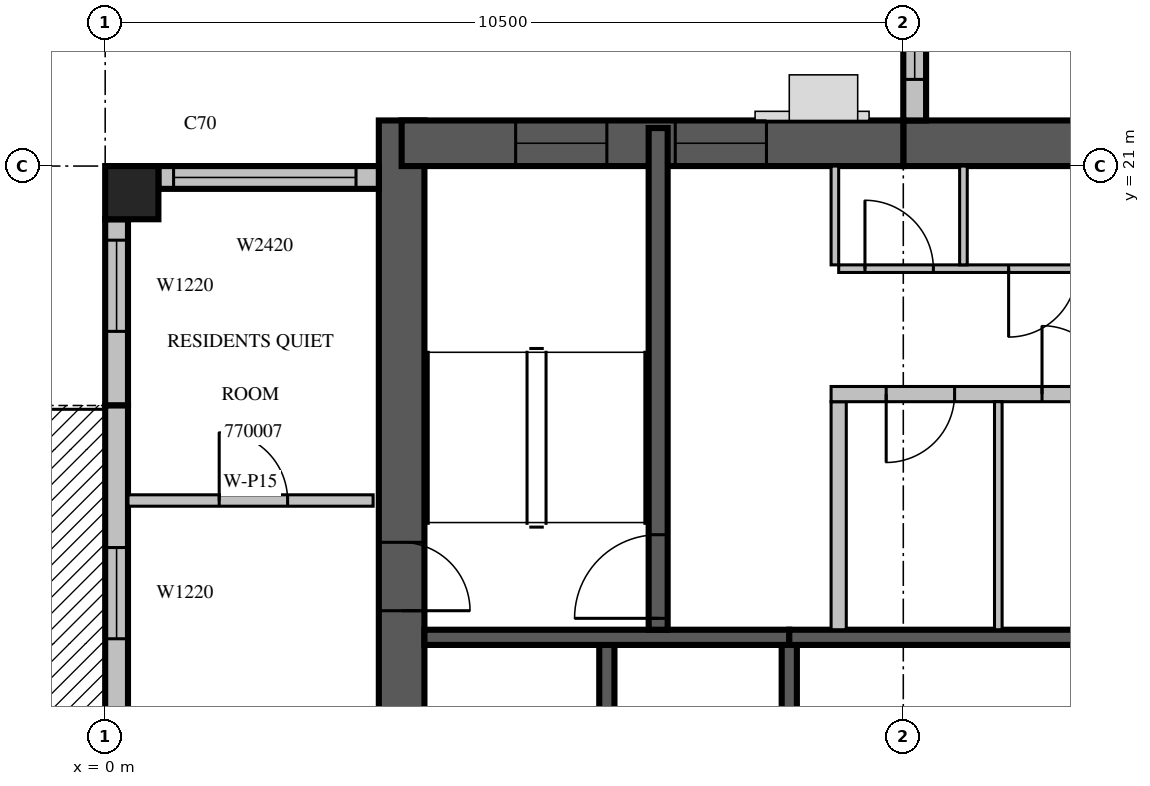
"""IFC4 building model, lengths in metres.
Left out: names, types, materials, properties, quantities, classifications, styles, units other than length and angle.
Written with IfcOpenShell. Run it as: python <this file> out.ifc"""

import sys

from ifc_helpers import new_model, si_unit, direction, frame, frame_2d, origin, origin_2d, place, context, subcontext, project, spatial, rectangle, extrude, source, transform, mapped, element, fill, save


model = new_model("IFC4")
c1 = context("Model", 3, precision=1e-05, world=origin(), true_north=direction((0.0, 1.0)))
c2 = subcontext(c1, "Body", "Model", "MODEL_VIEW")
j1 = project(units=[si_unit("LENGTHUNIT", "METRE"), si_unit("PLANEANGLEUNIT", "RADIAN")], contexts=[c1])
p1 = place(None, origin())
s1 = spatial("IfcSite", under=j1, at=p1, CompositionType="ELEMENT")
p2 = place(p1, origin())
s2 = spatial("IfcBuilding", under=s1, at=p2, CompositionType="ELEMENT")
p3 = place(p2, frame((0.0, 0.0, 305.5)))
s3 = spatial("IfcBuildingStorey", under=s2, at=p3, CompositionType="ELEMENT", Elevation=305.5)
m1 = source(origin(), c2, "Body", "SweptSolid", [
    extrude(rectangle(XDim=0.7, YDim=0.7, at=origin_2d()), origin(), (0.0, 0.0, 1.0), 3.5),
])
p4 = place(p3, frame((0.35, 20.65, 0.0), z_axis=(0.0, 0.0, 1.0), x_axis=(1.0, 0.0, 0.0)))
e1 = element("IfcColumn", 1, at=p4, inside=s3, PredefinedType="COLUMN", context=c2, shape_type="MappedRepresentation", body=[
    mapped(m1, transform((0.0, 0.0, 0.0), scale=1.0)),
])
m2 = source(origin(), c2, "Body", "SweptSolid", [
    extrude(rectangle(XDim=17.4, YDim=0.6, at=frame_2d((8.7, 0.0))), origin(), (0.0, 0.0, 1.0), 3.5),
])
p5 = place(p3, frame((3.9, 4.2, 0.0), z_axis=(0.0, 0.0, 1.0), x_axis=(0.0, 1.0, 0.0)))
e2 = element("IfcWall", 2, at=p5, inside=s3, PredefinedType="SHEAR", context=c2, shape_type="MappedRepresentation", body=[
    mapped(m2, transform((0.0, 0.0, 0.0), scale=1.0)),
])
m3 = source(origin(), c2, "Body", "SweptSolid", [
    extrude(rectangle(XDim=2.2, YDim=2.1, at=frame_2d((1.1, 1.05))), frame((0.0, 0.31, 0.0), z_axis=(0.0, -1.0, 0.0), x_axis=(1.0, 0.0, 0.0)), (0.0, 0.0, 1.0), 0.62),
])
p6 = place(p5, frame((4.2, 0.0, 0.0)))
e3 = element("IfcOpeningElement", 3, at=p6, cuts=e2, PredefinedType="OPENING", context=c2, shape_type="MappedRepresentation", body=[
    mapped(m3, transform((0.0, 0.0, 0.0), scale=1.0)),
])
m4 = source(origin(), c2, "Body", "SweptSolid", [
    extrude(rectangle(XDim=0.9, YDim=2.1, at=frame_2d((0.45, 1.05))), frame((0.0, 0.31, 0.0), z_axis=(0.0, -1.0, 0.0), x_axis=(1.0, 0.0, 0.0)), (0.0, 0.0, 1.0), 0.62),
])
p7 = place(p5, frame((10.95, 0.0, 0.0)))
e4 = element("IfcOpeningElement", 4, at=p7, cuts=e2, PredefinedType="OPENING", context=c2, shape_type="MappedRepresentation", body=[
    mapped(m4, transform((0.0, 0.0, 0.0), scale=1.0)),
])
m5 = source(origin(), c2, "Body", "SweptSolid", [
    extrude(rectangle(XDim=11.1, YDim=0.6, at=frame_2d((5.55, 0.0))), origin(), (0.0, 0.0, 1.0), 3.5),
])
p8 = place(p3, frame((10.5, 21.3, 0.0), z_axis=(0.0, 0.0, 1.0), x_axis=(1.0, 0.0, 0.0)))
e5 = element("IfcWall", 5, at=p8, inside=s3, PredefinedType="SHEAR", context=c2, shape_type="MappedRepresentation", body=[
    mapped(m5, transform((0.0, 0.0, 0.0), scale=1.0)),
])
m6 = source(origin(), c2, "Body", "SweptSolid", [
    extrude(rectangle(XDim=1.2, YDim=2.1, at=frame_2d((0.6, 1.05))), frame((0.0, 0.31, 0.0), z_axis=(0.0, -1.0, 0.0), x_axis=(1.0, 0.0, 0.0)), (0.0, 0.0, 1.0), 0.62),
])
p9 = place(p8, frame((8.7, 0.0, 0.0)))
e6 = element("IfcOpeningElement", 6, at=p9, cuts=e5, PredefinedType="OPENING", context=c2, shape_type="MappedRepresentation", body=[
    mapped(m6, transform((0.0, 0.0, 0.0), scale=1.0)),
])
m7 = source(origin(), c2, "Body", "SweptSolid", [
    extrude(rectangle(XDim=6.6, YDim=0.6, at=frame_2d((3.3, 0.0))), origin(), (0.0, 0.0, 1.0), 3.5),
])
p10 = place(p3, frame((3.9, 21.3, 0.0), z_axis=(0.0, 0.0, 1.0), x_axis=(1.0, 0.0, 0.0)))
e7 = element("IfcWall", 7, at=p10, inside=s3, PredefinedType="SHEAR", context=c2, shape_type="MappedRepresentation", body=[
    mapped(m7, transform((0.0, 0.0, 0.0), scale=1.0)),
])
m8 = source(origin(), c2, "Body", "SweptSolid", [
    extrude(rectangle(XDim=1.2, YDim=2.4, at=frame_2d((0.6, 1.2))), frame((0.0, 0.31, 0.0), z_axis=(0.0, -1.0, 0.0), x_axis=(1.0, 0.0, 0.0)), (0.0, 0.0, 1.0), 0.62),
])
p11 = place(p10, frame((1.5, 0.0, 0.6)))
e8 = element("IfcOpeningElement", 8, at=p11, cuts=e7, PredefinedType="OPENING", context=c2, shape_type="MappedRepresentation", body=[
    mapped(m8, transform((0.0, 0.0, 0.0), scale=1.0)),
])
p12 = place(p10, frame((3.6, 0.0, 0.6)))
e9 = element("IfcOpeningElement", 9, at=p12, cuts=e7, PredefinedType="OPENING", context=c2, shape_type="MappedRepresentation", body=[
    mapped(m8, transform((0.0, 0.0, 0.0), scale=1.0)),
])
m9 = source(origin(), c2, "Body", "SweptSolid", [
    extrude(rectangle(XDim=5.28, YDim=0.3, at=frame_2d((2.64, 0.0))), origin(), (0.0, 0.0, 1.0), 3.1),
])
p13 = place(p3, frame((10.65, 26.88, 0.0), z_axis=(0.0, 0.0, 1.0), x_axis=(0.0, -1.0, 0.0)))
e10 = element("IfcWall", 10, at=p13, inside=s3, PredefinedType="STANDARD", context=c2, shape_type="MappedRepresentation", body=[
    mapped(m9, transform((0.0, 0.0, 0.0), scale=1.0)),
])
m10 = source(origin(), c2, "Body", "SweptSolid", [
    extrude(rectangle(XDim=3.6, YDim=2.0, at=frame_2d((1.8, 1.0))), frame((0.0, 0.16, 0.0), z_axis=(0.0, -1.0, 0.0), x_axis=(1.0, 0.0, 0.0)), (0.0, 0.0, 1.0), 0.32),
])
p14 = place(p13, frame((1.14, 0.0, 0.6)))
e11 = element("IfcOpeningElement", 11, at=p14, cuts=e10, PredefinedType="OPENING", context=c2, shape_type="MappedRepresentation", body=[
    mapped(m10, transform((0.0, 0.0, 0.0), scale=1.0)),
])
m11 = source(origin(), c2, "Body", "SweptSolid", [
    extrude(rectangle(XDim=2.9, YDim=0.3, at=frame_2d((1.45, 0.0))), origin(), (0.0, 0.0, 1.0), 3.1),
])
p15 = place(p3, frame((3.6, 20.85, 0.0), z_axis=(0.0, 0.0, 1.0), x_axis=(-1.0, 0.0, 0.0)))
e12 = element("IfcWall", 12, at=p15, inside=s3, PredefinedType="STANDARD", context=c2, shape_type="MappedRepresentation", body=[
    mapped(m11, transform((0.0, 0.0, 0.0), scale=1.0)),
])
m12 = source(origin(), c2, "Body", "SweptSolid", [
    extrude(rectangle(XDim=2.4, YDim=2.0, at=frame_2d((1.2, 1.0))), frame((0.0, 0.16, 0.0), z_axis=(0.0, -1.0, 0.0), x_axis=(1.0, 0.0, 0.0)), (0.0, 0.0, 1.0), 0.32),
])
p16 = place(p15, frame((0.3, 0.0, 0.6)))
e13 = element("IfcOpeningElement", 13, at=p16, cuts=e12, PredefinedType="OPENING", context=c2, shape_type="MappedRepresentation", body=[
    mapped(m12, transform((0.0, 0.0, 0.0), scale=1.0)),
])
m13 = source(origin(), c2, "Body", "SweptSolid", [
    extrude(rectangle(XDim=2.45, YDim=0.3, at=frame_2d((1.225, 0.0))), origin(), (0.0, 0.0, 1.0), 3.1),
])
p17 = place(p3, frame((0.15, 20.3, 0.0), z_axis=(0.0, 0.0, 1.0), x_axis=(0.0, -1.0, 0.0)))
e14 = element("IfcWall", 14, at=p17, inside=s3, PredefinedType="STANDARD", context=c2, shape_type="MappedRepresentation", body=[
    mapped(m13, transform((0.0, 0.0, 0.0), scale=1.0)),
])
m14 = source(origin(), c2, "Body", "SweptSolid", [
    extrude(rectangle(XDim=1.2, YDim=2.0, at=frame_2d((0.6, 1.0))), frame((0.0, 0.16, 0.0), z_axis=(0.0, -1.0, 0.0), x_axis=(1.0, 0.0, 0.0)), (0.0, 0.0, 1.0), 0.32),
])
p18 = place(p17, frame((0.275, 0.0, 0.6)))
e15 = element("IfcOpeningElement", 15, at=p18, cuts=e14, PredefinedType="OPENING", context=c2, shape_type="MappedRepresentation", body=[
    mapped(m14, transform((0.0, 0.0, 0.0), scale=1.0)),
])
m15 = source(origin(), c2, "Body", "SweptSolid", [
    extrude(rectangle(XDim=7.0, YDim=0.3, at=frame_2d((3.5, 0.0))), origin(), (0.0, 0.0, 1.0), 3.1),
])
p19 = place(p3, frame((0.15, 17.85, 0.0), z_axis=(0.0, 0.0, 1.0), x_axis=(0.0, -1.0, 0.0)))
e16 = element("IfcWall", 16, at=p19, inside=s3, PredefinedType="STANDARD", context=c2, shape_type="MappedRepresentation", body=[
    mapped(m15, transform((0.0, 0.0, 0.0), scale=1.0)),
])
m16 = source(origin(), c2, "Body", "SweptSolid", [
    extrude(rectangle(XDim=1.8, YDim=2.4, at=frame_2d((0.9, 1.2))), frame((0.0, 0.16, 0.0), z_axis=(0.0, -1.0, 0.0), x_axis=(1.0, 0.0, 0.0)), (0.0, 0.0, 1.0), 0.32),
])
p20 = place(p19, frame((4.725, 0.0, 0.0)))
e17 = element("IfcOpeningElement", 17, at=p20, cuts=e16, PredefinedType="OPENING", context=c2, shape_type="MappedRepresentation", body=[
    mapped(m16, transform((0.0, 0.0, 0.0), scale=1.0)),
])
p21 = place(p19, frame((1.869, 0.0, 0.6)))
e18 = element("IfcOpeningElement", 18, at=p21, cuts=e16, PredefinedType="OPENING", context=c2, shape_type="MappedRepresentation", body=[
    mapped(m14, transform((0.0, 0.0, 0.0), scale=1.0)),
])
m17 = source(origin(), c2, "Body", "SweptSolid", [
    extrude(rectangle(XDim=3.0, YDim=0.2, at=frame_2d((1.5, 0.0))), origin(), (0.0, 0.0, 1.0), 3.5),
])
p22 = place(p3, frame((6.6, 11.7, 0.0), z_axis=(0.0, 0.0, 1.0), x_axis=(0.0, 1.0, 0.0)))
e19 = element("IfcWall", 19, at=p22, inside=s3, PredefinedType="SOLIDWALL", context=c2, shape_type="MappedRepresentation", body=[
    mapped(m17, transform((0.0, 0.0, 0.0), scale=1.0)),
])
m18 = source(origin(), c2, "Body", "SweptSolid", [
    extrude(rectangle(XDim=3.0, YDim=0.2, at=frame_2d((1.5, 0.0))), origin(), (0.0, 0.0, 1.0), 3.1),
])
p23 = place(p3, frame((9.0, 11.7, 0.0), z_axis=(0.0, 0.0, 1.0), x_axis=(0.0, 1.0, 0.0)))
e20 = element("IfcWall", 20, at=p23, inside=s3, PredefinedType="SOLIDWALL", context=c2, shape_type="MappedRepresentation", body=[
    mapped(m18, transform((0.0, 0.0, 0.0), scale=1.0)),
])
m19 = source(origin(), c2, "Body", "SweptSolid", [
    extrude(rectangle(XDim=4.8, YDim=0.2, at=frame_2d((2.4, 0.0))), origin(), (0.0, 0.0, 1.0), 3.5),
])
p24 = place(p3, frame((4.2, 14.8, 0.0), z_axis=(0.0, 0.0, 1.0), x_axis=(1.0, 0.0, 0.0)))
e21 = element("IfcWall", 21, at=p24, inside=s3, PredefinedType="SOLIDWALL", context=c2, shape_type="MappedRepresentation", body=[
    mapped(m19, transform((0.0, 0.0, 0.0), scale=1.0)),
])
m20 = source(origin(), c2, "Body", "SweptSolid", [
    extrude(rectangle(XDim=4.8, YDim=0.2, at=frame_2d((2.4, 0.0))), origin(), (0.0, 0.0, 1.0), 3.1),
])
p25 = place(p3, frame((9.0, 14.8, 0.0), z_axis=(0.0, 0.0, 1.0), x_axis=(1.0, 0.0, 0.0)))
e22 = element("IfcWall", 22, at=p25, inside=s3, PredefinedType="SOLIDWALL", context=c2, shape_type="MappedRepresentation", body=[
    mapped(m20, transform((0.0, 0.0, 0.0), scale=1.0)),
])
m21 = source(origin(), c2, "Body", "SweptSolid", [
    extrude(rectangle(XDim=6.6, YDim=0.25, at=frame_2d((3.3, 0.0))), origin(), (0.0, 0.0, 1.0), 3.1),
])
p26 = place(p3, frame((7.275, 14.9, 0.0), z_axis=(0.0, 0.0, 1.0), x_axis=(0.0, 1.0, 0.0)))
e23 = element("IfcWall", 23, at=p26, inside=s3, PredefinedType="SOLIDWALL", context=c2, shape_type="MappedRepresentation", body=[
    mapped(m21, transform((0.0, 0.0, 0.0), scale=1.0)),
])
m22 = source(origin(), c2, "Body", "SweptSolid", [
    extrude(rectangle(XDim=1.1, YDim=2.1, at=frame_2d((0.55, 1.05))), frame((0.0, 0.135, 0.0), z_axis=(0.0, -1.0, 0.0), x_axis=(1.0, 0.0, 0.0)), (0.0, 0.0, 1.0), 0.27),
])
p27 = place(p26, frame((0.15, 0.0, 0.0)))
e24 = element("IfcOpeningElement", 24, at=p27, cuts=e23, PredefinedType="OPENING", context=c2, shape_type="MappedRepresentation", body=[
    mapped(m22, transform((0.0, 0.0, 0.0), scale=1.0)),
])
m23 = source(origin(), c2, "Body", "SweptSolid", [
    extrude(rectangle(XDim=3.0, YDim=0.2, at=frame_2d((1.5, 0.0))), origin(), (0.0, 0.0, 1.0), 3.1),
])
p28 = place(p3, frame((9.65, 14.9, 0.0), z_axis=(0.0, 0.0, 1.0), x_axis=(0.0, 1.0, 0.0)))
e25 = element("IfcWall", 25, at=p28, inside=s3, PredefinedType="PARTITIONING", context=c2, shape_type="MappedRepresentation", body=[
    mapped(m23, transform((0.0, 0.0, 0.0), scale=1.0)),
])
m24 = source(origin(), c2, "Body", "SweptSolid", [
    extrude(rectangle(XDim=11.45, YDim=0.2, at=frame_2d((5.725, 0.0))), origin(), (0.0, 0.0, 1.0), 3.1),
])
p29 = place(p3, frame((9.55, 18.0, 0.0), z_axis=(0.0, 0.0, 1.0), x_axis=(1.0, 0.0, 0.0)))
e26 = element("IfcWall", 26, at=p29, inside=s3, PredefinedType="PARTITIONING", context=c2, shape_type="MappedRepresentation", body=[
    mapped(m24, transform((0.0, 0.0, 0.0), scale=1.0)),
])
m25 = source(origin(), c2, "Body", "SweptSolid", [
    extrude(rectangle(XDim=0.9, YDim=2.1, at=frame_2d((0.45, 1.05))), frame((0.0, 0.11, 0.0), z_axis=(0.0, -1.0, 0.0), x_axis=(1.0, 0.0, 0.0)), (0.0, 0.0, 1.0), 0.22),
])
p30 = place(p29, frame((0.725, 0.0, 0.0)))
e27 = element("IfcOpeningElement", 27, at=p30, cuts=e26, PredefinedType="OPENING", context=c2, shape_type="MappedRepresentation", body=[
    mapped(m25, transform((0.0, 0.0, 0.0), scale=1.0)),
])
p31 = place(p29, frame((2.775, 0.0, 0.0)))
e28 = element("IfcOpeningElement", 28, at=p31, cuts=e26, PredefinedType="OPENING", context=c2, shape_type="MappedRepresentation", body=[
    mapped(m25, transform((0.0, 0.0, 0.0), scale=1.0)),
])
m26 = source(origin(), c2, "Body", "SweptSolid", [
    extrude(rectangle(XDim=1.1, YDim=2.1, at=frame_2d((0.55, 1.05))), frame((0.0, 0.11, 0.0), z_axis=(0.0, -1.0, 0.0), x_axis=(1.0, 0.0, 0.0)), (0.0, 0.0, 1.0), 0.22),
])
p32 = place(p29, frame((7.35, 0.0, 0.0)))
e29 = element("IfcOpeningElement", 29, at=p32, cuts=e26, PredefinedType="OPENING", context=c2, shape_type="MappedRepresentation", body=[
    mapped(m26, transform((0.0, 0.0, 0.0), scale=1.0)),
])
m27 = source(origin(), c2, "Body", "SweptSolid", [
    extrude(rectangle(XDim=9.4, YDim=0.1, at=frame_2d((4.7, 0.0))), origin(), (0.0, 0.0, 1.0), 3.1),
])
p33 = place(p3, frame((9.65, 19.65, 0.0), z_axis=(0.0, 0.0, 1.0), x_axis=(1.0, 0.0, 0.0)))
e30 = element("IfcWall", 30, at=p33, inside=s3, PredefinedType="PARTITIONING", context=c2, shape_type="MappedRepresentation", body=[
    mapped(m27, transform((0.0, 0.0, 0.0), scale=1.0)),
])
m28 = source(origin(), c2, "Body", "SweptSolid", [
    extrude(rectangle(XDim=0.9, YDim=2.1, at=frame_2d((0.45, 1.05))), frame((0.0, 0.06, 0.0), z_axis=(0.0, -1.0, 0.0), x_axis=(1.0, 0.0, 0.0)), (0.0, 0.0, 1.0), 0.12),
])
p34 = place(p33, frame((0.346, 0.0, 0.0)))
e31 = element("IfcOpeningElement", 31, at=p34, cuts=e30, PredefinedType="OPENING", context=c2, shape_type="MappedRepresentation", body=[
    mapped(m28, transform((0.0, 0.0, 0.0), scale=1.0)),
])
p35 = place(p33, frame((2.236, 0.0, 0.0)))
e32 = element("IfcOpeningElement", 32, at=p35, cuts=e30, PredefinedType="OPENING", context=c2, shape_type="MappedRepresentation", body=[
    mapped(m28, transform((0.0, 0.0, 0.0), scale=1.0)),
])
p36 = place(p33, frame((4.026, 0.0, 0.0)))
e33 = element("IfcOpeningElement", 33, at=p36, cuts=e30, PredefinedType="OPENING", context=c2, shape_type="MappedRepresentation", body=[
    mapped(m28, transform((0.0, 0.0, 0.0), scale=1.0)),
])
p37 = place(p33, frame((5.742, 0.0, 0.0)))
e34 = element("IfcOpeningElement", 34, at=p37, cuts=e30, PredefinedType="OPENING", context=c2, shape_type="MappedRepresentation", body=[
    mapped(m28, transform((0.0, 0.0, 0.0), scale=1.0)),
])
p38 = place(p33, frame((7.856, 0.0, 0.0)))
e35 = element("IfcOpeningElement", 35, at=p38, cuts=e30, PredefinedType="OPENING", context=c2, shape_type="MappedRepresentation", body=[
    mapped(m28, transform((0.0, 0.0, 0.0), scale=1.0)),
])
m29 = source(origin(), c2, "Body", "SweptSolid", [
    extrude(rectangle(XDim=1.3, YDim=0.1, at=frame_2d((0.65, 0.0))), origin(), (0.0, 0.0, 1.0), 3.1),
])
for number, where, z_axis, x_axis in (
    (36, (11.291, 19.7, 0.0), (0.0, 0.0, 1.0), (0.0, 1.0, 0.0)),
    (37, (9.6, 19.7, 0.0), (0.0, 0.0, 1.0), (0.0, 1.0, 0.0)),
):
    element("IfcWall", number, at=place(p3, frame(where, z_axis=z_axis, x_axis=x_axis)), inside=s3, PredefinedType="PARTITIONING", context=c2, shape_type="MappedRepresentation", body=[
        mapped(m29, transform((0.0, 0.0, 0.0), scale=1.0)),
    ])
m30 = source(origin(), c2, "Body", "SweptSolid", [
    extrude(rectangle(XDim=3.0, YDim=0.1, at=frame_2d((1.5, 0.0))), origin(), (0.0, 0.0, 1.0), 3.1),
])
p39 = place(p3, frame((11.75, 14.9, 0.0), z_axis=(0.0, 0.0, 1.0), x_axis=(0.0, 1.0, 0.0)))
e38 = element("IfcWall", 38, at=p39, inside=s3, PredefinedType="PARTITIONING", context=c2, shape_type="MappedRepresentation", body=[
    mapped(m30, transform((0.0, 0.0, 0.0), scale=1.0)),
])
m31 = source(origin(), c2, "Body", "SweptSolid", [
    extrude(rectangle(XDim=3.225, YDim=0.15, at=frame_2d((1.613, 0.0))), origin(), (0.0, 0.0, 1.0), 3.1),
])
p40 = place(p3, frame((0.3, 16.6, 0.0), z_axis=(0.0, 0.0, 1.0), x_axis=(1.0, 0.0, 0.0)))
e39 = element("IfcWall", 39, at=p40, inside=s3, PredefinedType="PARTITIONING", context=c2, shape_type="MappedRepresentation", body=[
    mapped(m31, transform((0.0, 0.0, 0.0), scale=1.0)),
])
m32 = source(origin(), c2, "Body", "SweptSolid", [
    extrude(rectangle(XDim=0.9, YDim=2.1, at=frame_2d((0.45, 1.05))), frame((0.0, 0.085, 0.0), z_axis=(0.0, -1.0, 0.0), x_axis=(1.0, 0.0, 0.0)), (0.0, 0.0, 1.0), 0.17),
])
p41 = place(p40, frame((1.2, 0.0, 0.0)))
e40 = element("IfcOpeningElement", 40, at=p41, cuts=e39, PredefinedType="OPENING", context=c2, shape_type="MappedRepresentation", body=[
    mapped(m32, transform((0.0, 0.0, 0.0), scale=1.0)),
])
m33 = source(origin(), c2, "Body", "SweptSolid", [
    extrude(rectangle(XDim=3.6, YDim=2.0, at=frame_2d((1.8, 1.0))), frame((0.0, 0.03, 0.0), z_axis=(0.0, -1.0, 0.0), x_axis=(1.0, 0.0, 0.0)), (0.0, 0.0, 1.0), 0.06),
])
p42 = place(p14, origin())
e41 = element("IfcWindow", 41, at=p42, inside=s3, PartitioningType="SINGLE_PANEL", PredefinedType="WINDOW", context=c2, shape_type="MappedRepresentation", body=[
    mapped(m33, transform((0.0, 0.0, 0.0), scale=1.0)),
])
fill(e11, e41)
m34 = source(origin(), c2, "Body", "SweptSolid", [
    extrude(rectangle(XDim=2.4, YDim=2.0, at=frame_2d((1.2, 1.0))), frame((0.0, 0.03, 0.0), z_axis=(0.0, -1.0, 0.0), x_axis=(1.0, 0.0, 0.0)), (0.0, 0.0, 1.0), 0.06),
])
p43 = place(p16, origin())
e42 = element("IfcWindow", 42, at=p43, inside=s3, PartitioningType="SINGLE_PANEL", PredefinedType="WINDOW", context=c2, shape_type="MappedRepresentation", body=[
    mapped(m34, transform((0.0, 0.0, 0.0), scale=1.0)),
])
fill(e13, e42)
m35 = source(origin(), c2, "Body", "SweptSolid", [
    extrude(rectangle(XDim=1.2, YDim=2.0, at=frame_2d((0.6, 1.0))), frame((0.0, 0.03, 0.0), z_axis=(0.0, -1.0, 0.0), x_axis=(1.0, 0.0, 0.0)), (0.0, 0.0, 1.0), 0.06),
])
p44 = place(p18, origin())
e43 = element("IfcWindow", 43, at=p44, inside=s3, PartitioningType="SINGLE_PANEL", PredefinedType="WINDOW", context=c2, shape_type="MappedRepresentation", body=[
    mapped(m35, transform((0.0, 0.0, 0.0), scale=1.0)),
])
fill(e15, e43)
p45 = place(p21, origin())
e44 = element("IfcWindow", 44, at=p45, inside=s3, PartitioningType="SINGLE_PANEL", PredefinedType="WINDOW", context=c2, shape_type="MappedRepresentation", body=[
    mapped(m35, transform((0.0, 0.0, 0.0), scale=1.0)),
])
fill(e18, e44)
m36 = source(origin(), c2, "Body", "SweptSolid", [
    extrude(rectangle(XDim=1.1, YDim=2.1, at=frame_2d((0.55, 1.05))), frame((0.0, 0.025, 0.0), z_axis=(0.0, -1.0, 0.0), x_axis=(1.0, 0.0, 0.0)), (0.0, 0.0, 1.0), 0.05),
])
p46 = place(p27, origin())
e45 = element("IfcDoor", 45, at=p46, inside=s3, OperationType="SINGLE_SWING_LEFT", PredefinedType="DOOR", context=c2, shape_type="MappedRepresentation", body=[
    mapped(m36, transform((0.0, 0.0, 0.0), scale=1.0)),
])
fill(e24, e45)
m37 = source(origin(), c2, "Body", "SweptSolid", [
    extrude(rectangle(XDim=0.9, YDim=2.1, at=frame_2d((0.45, 1.05))), frame((0.0, 0.025, 0.0), z_axis=(0.0, -1.0, 0.0), x_axis=(1.0, 0.0, 0.0)), (0.0, 0.0, 1.0), 0.05),
])
p47 = place(p30, origin())
e46 = element("IfcDoor", 46, at=p47, inside=s3, OperationType="SINGLE_SWING_RIGHT", PredefinedType="DOOR", context=c2, shape_type="MappedRepresentation", body=[
    mapped(m37, transform((0.0, 0.0, 0.0), scale=1.0)),
])
fill(e27, e46)
p48 = place(p31, origin())
e47 = element("IfcDoor", 47, at=p48, inside=s3, OperationType="SINGLE_SWING_LEFT", PredefinedType="DOOR", context=c2, shape_type="MappedRepresentation", body=[
    mapped(m37, transform((0.0, 0.0, 0.0), scale=1.0)),
])
fill(e28, e47)
p49 = place(p34, origin())
e48 = element("IfcDoor", 48, at=p49, inside=s3, OperationType="SINGLE_SWING_LEFT", PredefinedType="DOOR", context=c2, shape_type="MappedRepresentation", body=[
    mapped(m37, transform((0.0, 0.0, 0.0), scale=1.0)),
])
fill(e31, e48)
p50 = place(p35, origin())
e49 = element("IfcDoor", 49, at=p50, inside=s3, OperationType="SINGLE_SWING_RIGHT", PredefinedType="DOOR", context=c2, shape_type="MappedRepresentation", body=[
    mapped(m37, transform((0.0, 0.0, 0.0), scale=1.0)),
])
fill(e32, e49)
p51 = place(p7, origin())
e50 = element("IfcDoor", 50, at=p51, inside=s3, OperationType="SINGLE_SWING_RIGHT", PredefinedType="DOOR", context=c2, shape_type="MappedRepresentation", body=[
    mapped(m37, transform((0.0, 0.0, 0.0), scale=1.0)),
])
fill(e4, e50)
m38 = source(origin(), c2, "Body", "SweptSolid", [
    extrude(rectangle(XDim=1.2, YDim=2.4, at=frame_2d((0.6, 1.2))), frame((0.0, 0.03, 0.0), z_axis=(0.0, -1.0, 0.0), x_axis=(1.0, 0.0, 0.0)), (0.0, 0.0, 1.0), 0.06),
])
p52 = place(p11, origin())
e51 = element("IfcWindow", 51, at=p52, inside=s3, PartitioningType="SINGLE_PANEL", PredefinedType="WINDOW", context=c2, shape_type="MappedRepresentation", body=[
    mapped(m38, transform((0.0, 0.0, 0.0), scale=1.0)),
])
fill(e8, e51)
p53 = place(p12, origin())
e52 = element("IfcWindow", 52, at=p53, inside=s3, PartitioningType="SINGLE_PANEL", PredefinedType="WINDOW", context=c2, shape_type="MappedRepresentation", body=[
    mapped(m38, transform((0.0, 0.0, 0.0), scale=1.0)),
])
fill(e9, e52)
p54 = place(p41, origin())
e53 = element("IfcDoor", 53, at=p54, inside=s3, OperationType="SINGLE_SWING_LEFT", PredefinedType="DOOR", context=c2, shape_type="MappedRepresentation", body=[
    mapped(m37, transform((0.0, 0.0, 0.0), scale=1.0)),
])
fill(e40, e53)
save(model, sys.argv[1])
